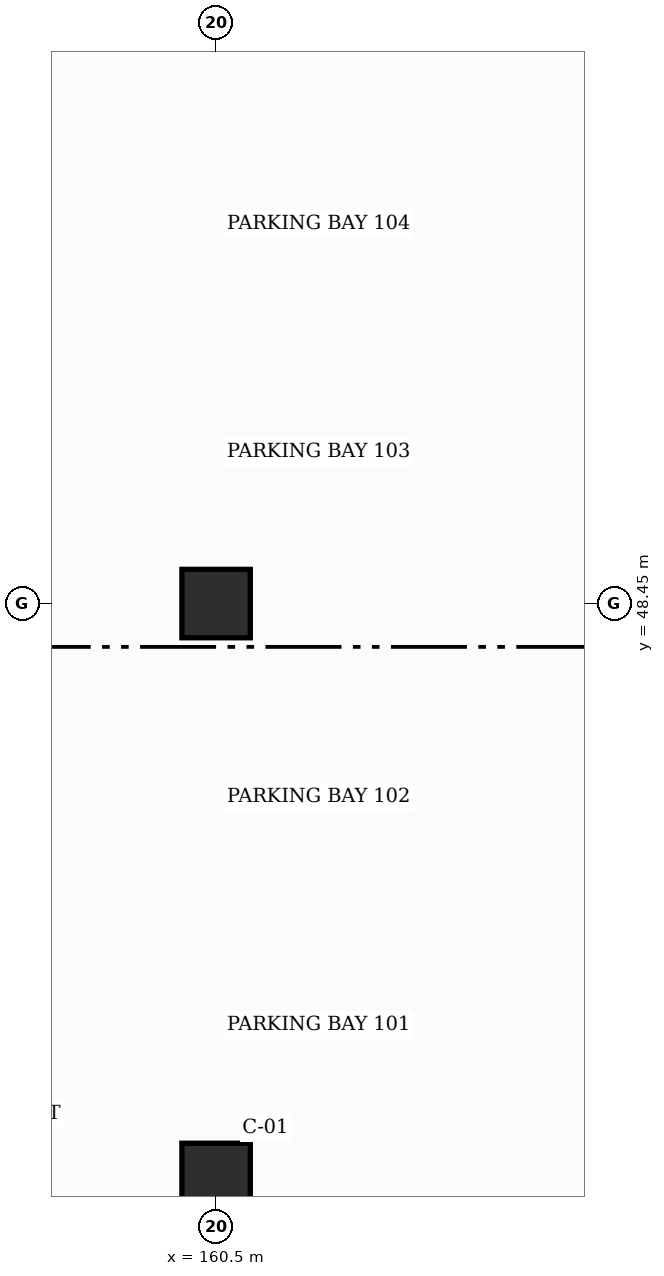
"""IFC4 building model, lengths in metres.
Left out: names, types, materials, properties, quantities, classifications, styles, units other than length and angle.
Written with IfcOpenShell. Run it as: python <this file> out.ifc"""

import sys

from ifc_helpers import new_model, si_unit, direction, frame, origin, origin_2d, place, context, subcontext, project, spatial, hollow_rectangle, extrude, element, save


model = new_model("IFC4")
c1 = context("Model", 3, precision=1e-05, world=origin(), true_north=direction((0.0, 1.0)))
c2 = subcontext(c1, "Body", "Model", "MODEL_VIEW")
j1 = project(units=[si_unit("LENGTHUNIT", "METRE"), si_unit("PLANEANGLEUNIT", "RADIAN")], contexts=[c1])
p1 = place(None, origin())
s1 = spatial("IfcSite", under=j1, at=p1, CompositionType="ELEMENT")
p2 = place(p1, origin())
s2 = spatial("IfcBuilding", under=s1, at=p2, CompositionType="ELEMENT")
p3 = place(p2, frame((0.0, 0.0, -5.4)))
s3 = spatial("IfcBuildingStorey", under=s2, at=p3, CompositionType="ELEMENT", Elevation=-5.4)
for number, where, z_axis, x_axis in (
    (1, (160.5, 40.9, 0.0), (0.0, 0.0, 1.0), (1.0, 0.0, 0.0)),
    (2, (160.5, 48.45, 0.0), (0.0, 0.0, 1.0), (1.0, 0.0, 0.0)),
):
    element("IfcColumn", number, at=place(p3, frame(where, z_axis=z_axis, x_axis=x_axis)), inside=s3, PredefinedType="COLUMN", context=c2, shape_type="SweptSolid", body=[
        extrude(hollow_rectangle(XDim=0.9, YDim=0.9, WallThickness=0.032, InnerFilletRadius=0.032, OuterFilletRadius=0.064, at=origin_2d()), origin(), (0.0, 0.0, 1.0), 5.4),
    ])
save(model, sys.argv[1])
